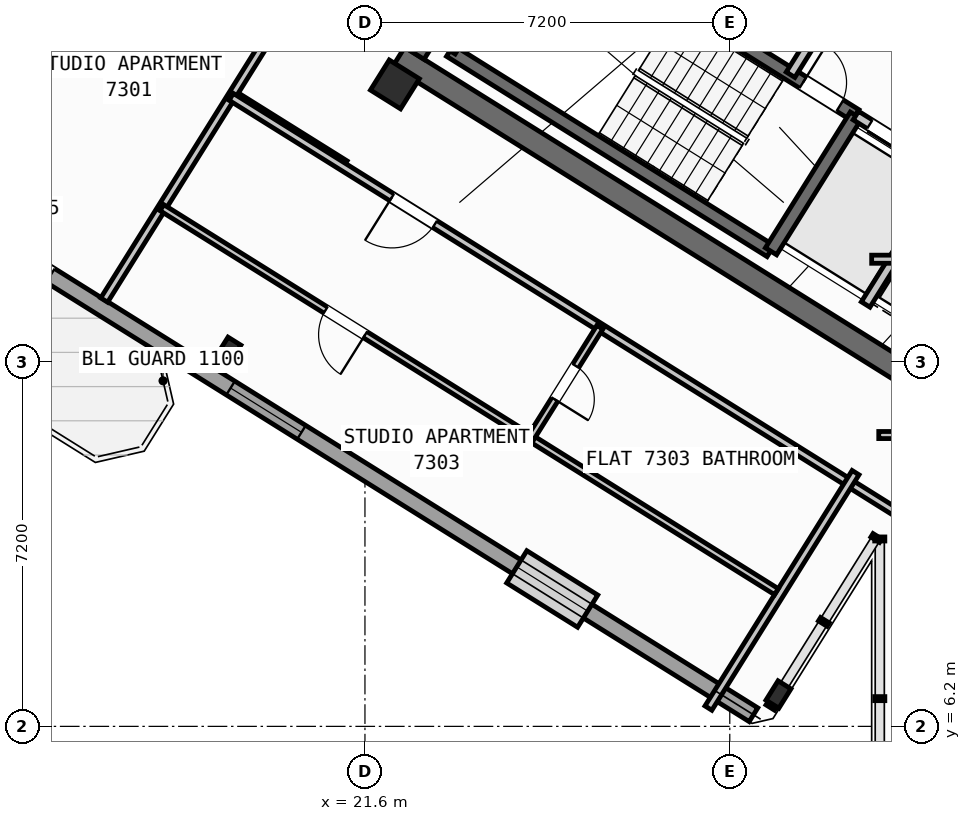
"""IFC4 building model, lengths in metres.
Left out: names, types, materials, properties, quantities, classifications, styles, units other than length and angle.
Written with IfcOpenShell. Run it as: python <this file> out.ifc"""

import sys

from ifc_helpers import new_model, si_unit, direction, frame, frame_2d, origin, origin_2d, place, context, subcontext, project, spatial, rectangle, hollow_rectangle, i_section, extrude, source, transform, mapped, element, fill, save


model = new_model("IFC4")
c1 = context("Model", 3, precision=1e-05, world=origin(), true_north=direction((0.0, 1.0)))
c2 = subcontext(c1, "Body", "Model", "MODEL_VIEW")
j1 = project(units=[si_unit("LENGTHUNIT", "METRE"), si_unit("PLANEANGLEUNIT", "RADIAN")], contexts=[c1])
p1 = place(None, origin())
s1 = spatial("IfcSite", under=j1, at=p1, CompositionType="ELEMENT")
p2 = place(p1, origin())
s2 = spatial("IfcBuilding", under=s1, at=p2, CompositionType="ELEMENT")
p3 = place(p2, frame((0.0, 0.0, 288.0)))
s3 = spatial("IfcBuildingStorey", under=s2, at=p3, CompositionType="ELEMENT", Elevation=288.0)
p4 = place(p3, frame((33.324, 12.503, 0.0), z_axis=(0.0, 0.0, 1.0), x_axis=(-0.848043529849, 0.529926571782, 0.0)))
e1 = element("IfcWall", 1, at=p4, inside=s3, PredefinedType="SHEAR", context=c2, shape_type="SweptSolid", body=[
    extrude(rectangle(XDim=13.04, YDim=0.45, at=frame_2d((6.52, 0.0))), origin(), (0.0, 0.0, 1.0), 3.35),
])
p5 = place(p3, frame((26.007, 24.976, 0.0), z_axis=(0.0, 0.0, 1.0), x_axis=(-0.529931155655, -0.848040665456, 0.0)))
e2 = element("IfcWall", 2, at=p5, inside=s3, PredefinedType="SHEAR", context=c2, shape_type="SweptSolid", body=[
    extrude(rectangle(XDim=6.475, YDim=0.45, at=frame_2d((3.238, 0.0))), origin(), (0.0, 0.0, 1.0), 3.35),
])
m1 = source(origin(), c2, "Body", "SweptSolid", [
    extrude(i_section(OverallWidth=0.3, OverallDepth=0.45, WebThickness=0.014, FlangeThickness=0.026, at=origin_2d()), origin(), (0.0, 0.0, 1.0), 3.6),
])
p6 = place(p3, frame((29.761, 6.829, 0.0), z_axis=(0.0, 0.0, 1.0), x_axis=(-0.848048096156, 0.529919264233, 0.0)))
e3 = element("IfcColumn", 3, at=p6, inside=s3, PredefinedType="COLUMN", context=c2, shape_type="MappedRepresentation", body=[
    mapped(m1, transform((0.0, 0.0, 0.0), scale=1.0)),
])
m2 = source(origin(), c2, "Body", "SweptSolid", [
    extrude(hollow_rectangle(XDim=0.7, YDim=0.7, WallThickness=0.028, at=origin_2d()), origin(), (0.0, 0.0, 1.0), 3.6),
])
p7 = place(p3, frame((22.191, 18.87, 0.0), z_axis=(0.0, 0.0, 1.0), x_axis=(-0.848048096156, 0.529919264233, 0.0)))
e4 = element("IfcColumn", 4, at=p7, inside=s3, PredefinedType="COLUMN", context=c2, shape_type="MappedRepresentation", body=[
    mapped(m2, transform((0.0, 0.0, 0.0), scale=1.0)),
])
p8 = place(p3, frame((18.906, 13.612, 0.0), z_axis=(0.0, 0.0, 1.0), x_axis=(-0.848048096156, 0.529919264233, 0.0)))
e5 = element("IfcColumn", 5, at=p8, inside=s3, PredefinedType="COLUMN", context=c2, shape_type="MappedRepresentation", body=[
    mapped(m1, transform((0.0, 0.0, 0.0), scale=1.0)),
])
p9 = place(p3, frame((29.268, 6.429, 0.0), z_axis=(0.0, 0.0, 1.0), x_axis=(-0.848048398186, 0.529918780885, 0.0)))
e6 = element("IfcWall", 6, at=p9, inside=s3, PredefinedType="STANDARD", context=c2, shape_type="SweptSolid", body=[
    extrude(rectangle(XDim=25.188, YDim=0.32, at=frame_2d((12.594, 0.0))), origin(), (0.0, 0.0, 1.0), 3.35),
])
p10 = place(p9, frame((16.362, 0.0, 0.0)))
e7 = element("IfcOpeningElement", 7, at=p10, cuts=e6, PredefinedType="OPENING", context=c2, shape_type="SweptSolid", body=[
    extrude(rectangle(XDim=1.2, YDim=2.15, at=frame_2d((0.6, 1.075))), frame((0.0, 0.17, 0.0), z_axis=(0.0, -1.0, 0.0), x_axis=(1.0, 0.0, 0.0)), (0.0, 0.0, 1.0), 0.34),
])
p11 = place(p9, frame((3.859, 0.0, 0.9)))
e8 = element("IfcOpeningElement", 8, at=p11, cuts=e6, PredefinedType="OPENING", context=c2, shape_type="SweptSolid", body=[
    extrude(rectangle(XDim=1.65, YDim=1.45, at=frame_2d((0.825, 0.725))), frame((0.0, 0.17, 0.0), z_axis=(0.0, -1.0, 0.0), x_axis=(1.0, 0.0, 0.0)), (0.0, 0.0, 1.0), 0.34),
])
p12 = place(p9, frame((10.519, 0.0, 0.9)))
e9 = element("IfcOpeningElement", 9, at=p12, cuts=e6, PredefinedType="OPENING", context=c2, shape_type="SweptSolid", body=[
    extrude(rectangle(XDim=1.65, YDim=1.45, at=frame_2d((0.825, 0.725))), frame((0.0, 0.17, 0.0), z_axis=(0.0, -1.0, 0.0), x_axis=(1.0, 0.0, 0.0)), (0.0, 0.0, 1.0), 0.34),
])
p13 = place(p9, frame((19.841, 0.0, 0.95)))
e10 = element("IfcOpeningElement", 10, at=p13, cuts=e6, PredefinedType="OPENING", context=c2, shape_type="SweptSolid", body=[
    extrude(rectangle(XDim=1.95, YDim=1.35, at=frame_2d((0.975, 0.675))), frame((0.0, 0.17, 0.0), z_axis=(0.0, -1.0, 0.0), x_axis=(1.0, 0.0, 0.0)), (0.0, 0.0, 1.0), 0.34),
])
p14 = place(p9, frame((23.478, 0.0, 1.0)))
e11 = element("IfcOpeningElement", 11, at=p14, cuts=e6, PredefinedType="OPENING", context=c2, shape_type="SweptSolid", body=[
    extrude(rectangle(XDim=0.9, YDim=1.25, at=frame_2d((0.45, 0.625))), frame((0.0, 0.17, 0.0), z_axis=(0.0, -1.0, 0.0), x_axis=(1.0, 0.0, 0.0)), (0.0, 0.0, 1.0), 0.34),
])
p15 = place(p3, frame((29.605, 15.581, 0.0), z_axis=(0.0, 0.0, 1.0), x_axis=(-0.848036911448, 0.529937163087, 0.0)))
e12 = element("IfcWall", 12, at=p15, inside=s3, PredefinedType="SHEAR", context=c2, shape_type="SweptSolid", body=[
    extrude(rectangle(XDim=7.46, YDim=0.26, at=frame_2d((3.73, 0.0))), origin(), (0.0, 0.0, 1.0), 3.35),
])
p16 = place(p3, frame((31.28, 18.261, 0.0), z_axis=(0.0, 0.0, 1.0), x_axis=(-0.848051618787, 0.529913626805, 0.0)))
e13 = element("IfcWall", 13, at=p16, inside=s3, PredefinedType="SHEAR", context=c2, shape_type="SweptSolid", body=[
    extrude(rectangle(XDim=7.46, YDim=0.26, at=frame_2d((3.73, 0.0))), origin(), (0.0, 0.0, 1.0), 3.35),
])
p17 = place(p16, frame((0.36, 0.0, 0.0)))
e14 = element("IfcOpeningElement", 14, at=p17, cuts=e13, PredefinedType="OPENING", context=c2, shape_type="SweptSolid", body=[
    extrude(rectangle(XDim=0.86, YDim=2.05, at=frame_2d((0.43, 1.025))), frame((0.0, 0.14, 0.0), z_axis=(0.0, -1.0, 0.0), x_axis=(1.0, 0.0, 0.0)), (0.0, 0.0, 1.0), 0.28),
])
p18 = place(p3, frame((31.288, 18.256, 0.0), z_axis=(0.0, 0.0, 1.0), x_axis=(-0.529943379326, -0.848033026897, 0.0)))
e15 = element("IfcWall", 15, at=p18, inside=s3, PredefinedType="SHEAR", context=c2, shape_type="SweptSolid", body=[
    extrude(rectangle(XDim=3.16, YDim=0.26, at=frame_2d((1.58, 0.0))), origin(), (0.0, 0.0, 1.0), 3.35),
])
p19 = place(p3, frame((24.945, 22.22, 0.0), z_axis=(0.0, 0.0, 1.0), x_axis=(-0.529908658664, -0.84805472316, 0.0)))
e16 = element("IfcWall", 16, at=p19, inside=s3, PredefinedType="SHEAR", context=c2, shape_type="SweptSolid", body=[
    extrude(rectangle(XDim=3.16, YDim=0.26, at=frame_2d((1.58, 0.0))), origin(), (0.0, 0.0, 1.0), 3.35),
])
p20 = place(p3, frame((34.933, 15.978, 0.0), z_axis=(0.0, 0.0, 1.0), x_axis=(-0.848055739377, 0.529907032327, 0.0)))
e17 = element("IfcWall", 17, at=p20, inside=s3, PredefinedType="STANDARD", context=c2, shape_type="SweptSolid", body=[
    extrude(rectangle(XDim=4.298, YDim=0.2, at=frame_2d((2.149, 0.0))), origin(), (0.0, 0.0, 1.0), 3.34),
])
p21 = place(p20, frame((0.448, 0.0, 0.0)))
e18 = element("IfcOpeningElement", 18, at=p21, cuts=e17, PredefinedType="OPENING", context=c2, shape_type="SweptSolid", body=[
    extrude(rectangle(XDim=1.3, YDim=2.2, at=frame_2d((0.65, 1.1))), frame((0.0, 0.11, 0.0), z_axis=(0.0, -1.0, 0.0), x_axis=(1.0, 0.0, 0.0)), (0.0, 0.0, 1.0), 0.22),
])
p22 = place(p20, frame((2.523, 0.0, 0.0)))
e19 = element("IfcOpeningElement", 19, at=p22, cuts=e17, PredefinedType="OPENING", context=c2, shape_type="SweptSolid", body=[
    extrude(rectangle(XDim=1.45, YDim=2.25, at=frame_2d((0.725, 1.125))), frame((0.0, 0.11, 0.0), z_axis=(0.0, -1.0, 0.0), x_axis=(1.0, 0.0, 0.0)), (0.0, 0.0, 1.0), 0.22),
])
p23 = place(p3, frame((36.459, 18.421, 0.0), z_axis=(0.0, 0.0, 1.0), x_axis=(-0.848059591691, 0.529900867089, 0.0)))
e20 = element("IfcWall", 20, at=p23, inside=s3, PredefinedType="STANDARD", context=c2, shape_type="SweptSolid", body=[
    extrude(rectangle(XDim=5.818, YDim=0.2, at=frame_2d((2.909, 0.0))), origin(), (0.0, 0.0, 1.0), 3.34),
])
p24 = place(p23, frame((2.598, 0.0, 0.0)))
e21 = element("IfcOpeningElement", 21, at=p24, cuts=e20, PredefinedType="OPENING", context=c2, shape_type="SweptSolid", body=[
    extrude(rectangle(XDim=1.15, YDim=2.1, at=frame_2d((0.575, 1.05))), frame((0.0, 0.11, 0.0), z_axis=(0.0, -1.0, 0.0), x_axis=(1.0, 0.0, 0.0)), (0.0, 0.0, 1.0), 0.22),
])
p25 = place(p3, frame((33.029, 17.003, 0.0), z_axis=(0.0, 0.0, 1.0), x_axis=(-0.529916267533, -0.848049968695, 0.0)))
e22 = element("IfcWall", 22, at=p25, inside=s3, PredefinedType="STANDARD", context=c2, shape_type="SweptSolid", body=[
    extrude(rectangle(XDim=2.92, YDim=0.2, at=frame_2d((1.46, 0.0))), origin(), (0.0, 0.0, 1.0), 3.34),
])
p26 = place(p3, frame((31.525, 21.504, 0.0), z_axis=(0.0, 0.0, 1.0), x_axis=(-0.529907497854, -0.848055448493, 0.0)))
e23 = element("IfcWall", 23, at=p26, inside=s3, PredefinedType="STANDARD", context=c2, shape_type="SweptSolid", body=[
    extrude(rectangle(XDim=2.88, YDim=0.2, at=frame_2d((1.44, 0.0))), origin(), (0.0, 0.0, 1.0), 3.34),
])
p27 = place(p3, frame((21.206, 17.292, 0.0), z_axis=(0.0, 0.0, 1.0), x_axis=(-0.848050851465, 0.529914854792, 0.0)))
e24 = element("IfcWall", 24, at=p27, inside=s3, PredefinedType="PARTITIONING", context=c2, shape_type="SweptSolid", body=[
    extrude(rectangle(XDim=2.61, YDim=0.16, at=frame_2d((1.305, 0.0))), origin(), (0.0, 0.0, 1.0), 3.34),
])
p28 = place(p3, frame((25.807, 29.582, 0.0), z_axis=(0.0, 0.0, 1.0), x_axis=(-0.529918119251, -0.84804881162, 0.0)))
e25 = element("IfcWall", 25, at=p28, inside=s3, PredefinedType="PARTITIONING", context=c2, shape_type="SweptSolid", body=[
    extrude(rectangle(XDim=17.65, YDim=0.16, at=frame_2d((8.825, 0.0))), origin(), (0.0, 0.0, 1.0), 3.34),
])
p29 = place(p3, frame((16.572, 21.954, 0.0), z_axis=(0.0, 0.0, 1.0), x_axis=(-0.529904903214, -0.848057069748, 0.0)))
e26 = element("IfcWall", 26, at=p29, inside=s3, PredefinedType="PARTITIONING", context=c2, shape_type="SweptSolid", body=[
    extrude(rectangle(XDim=5.601, YDim=0.16, at=frame_2d((2.801, 0.0))), origin(), (0.0, 0.0, 1.0), 2.875),
])
p30 = place(p3, frame((19.523, 33.508, 0.0), z_axis=(0.0, 0.0, 1.0), x_axis=(-0.529910765222, -0.848053406869, 0.0)))
e27 = element("IfcWall", 27, at=p30, inside=s3, PredefinedType="PARTITIONING", context=c2, shape_type="SweptSolid", body=[
    extrude(rectangle(XDim=17.92, YDim=0.11, at=frame_2d((8.96, 0.0))), origin(), (0.0, 0.0, 1.0), 3.34),
])
p31 = place(p30, frame((0.76, 0.0, 0.0)))
e28 = element("IfcOpeningElement", 28, at=p31, cuts=e27, PredefinedType="OPENING", context=c2, shape_type="SweptSolid", body=[
    extrude(rectangle(XDim=0.78, YDim=2.05, at=frame_2d((0.39, 1.025))), frame((0.0, 0.065, 0.0), z_axis=(0.0, -1.0, 0.0), x_axis=(1.0, 0.0, 0.0)), (0.0, 0.0, 1.0), 0.13),
])
p32 = place(p30, frame((6.289, 0.0, 0.0)))
e29 = element("IfcOpeningElement", 29, at=p32, cuts=e27, PredefinedType="OPENING", context=c2, shape_type="SweptSolid", body=[
    extrude(rectangle(XDim=0.92, YDim=2.08, at=frame_2d((0.46, 1.04))), frame((0.0, 0.065, 0.0), z_axis=(0.0, -1.0, 0.0), x_axis=(1.0, 0.0, 0.0)), (0.0, 0.0, 1.0), 0.13),
])
p33 = place(p3, frame((32.164, 10.374, 0.0), z_axis=(0.0, 0.0, 1.0), x_axis=(-0.848044107957, 0.529925646633, 0.0)))
e30 = element("IfcWall", 30, at=p33, inside=s3, PredefinedType="PARTITIONING", context=c2, shape_type="SweptSolid", body=[
    extrude(rectangle(XDim=15.57, YDim=0.16, at=frame_2d((7.785, 0.0))), origin(), (0.0, 0.0, 1.0), 3.34),
])
p34 = place(p33, frame((10.83, 0.0, 0.0)))
e31 = element("IfcOpeningElement", 31, at=p34, cuts=e30, PredefinedType="OPENING", context=c2, shape_type="SweptSolid", body=[
    extrude(rectangle(XDim=1.0, YDim=2.1, at=frame_2d((0.5, 1.05))), frame((0.0, 0.09, 0.0), z_axis=(0.0, -1.0, 0.0), x_axis=(1.0, 0.0, 0.0)), (0.0, 0.0, 1.0), 0.18),
])
p35 = place(p3, frame((31.282, 11.208, 0.0), z_axis=(0.0, 0.0, 1.0), x_axis=(-0.529938869374, -0.84803584519, 0.0)))
e32 = element("IfcWall", 32, at=p35, inside=s3, PredefinedType="PARTITIONING", context=c2, shape_type="SweptSolid", body=[
    extrude(rectangle(XDim=5.48, YDim=0.16, at=frame_2d((2.74, 0.0))), origin(), (0.0, 0.0, 1.0), 3.34),
])
p36 = place(p3, frame((29.72, 8.859, 0.0), z_axis=(0.0, 0.0, 1.0), x_axis=(-0.848049134363, 0.529917602752, 0.0)))
e33 = element("IfcWall", 33, at=p36, inside=s3, PredefinedType="PLUMBINGWALL", context=c2, shape_type="SweptSolid", body=[
    extrude(rectangle(XDim=14.3, YDim=0.14, at=frame_2d((7.15, 0.0))), origin(), (0.0, 0.0, 1.0), 3.34),
])
p37 = place(p36, frame((9.57, 0.0, 0.0)))
e34 = element("IfcOpeningElement", 34, at=p37, cuts=e33, PredefinedType="OPENING", context=c2, shape_type="SweptSolid", body=[
    extrude(rectangle(XDim=0.92, YDim=2.08, at=frame_2d((0.46, 1.04))), frame((0.0, 0.08, 0.0), z_axis=(0.0, -1.0, 0.0), x_axis=(1.0, 0.0, 0.0)), (0.0, 0.0, 1.0), 0.16),
])
p38 = place(p3, frame((26.237, 14.078, 0.0), z_axis=(0.0, 0.0, 1.0), x_axis=(-0.52995640672, -0.848024885824, 0.0)))
e35 = element("IfcWall", 35, at=p38, inside=s3, PredefinedType="PLUMBINGWALL", context=c2, shape_type="SweptSolid", body=[
    extrude(rectangle(XDim=2.58, YDim=0.14, at=frame_2d((1.29, 0.0))), origin(), (0.0, 0.0, 1.0), 3.34),
])
p39 = place(p38, frame((0.9, 0.0, 0.0)))
e36 = element("IfcOpeningElement", 36, at=p39, cuts=e35, PredefinedType="OPENING", context=c2, shape_type="SweptSolid", body=[
    extrude(rectangle(XDim=0.78, YDim=2.05, at=frame_2d((0.39, 1.025))), frame((0.0, 0.08, 0.0), z_axis=(0.0, -1.0, 0.0), x_axis=(1.0, 0.0, 0.0)), (0.0, 0.0, 1.0), 0.16),
])
p40 = place(p3, frame((31.6, 15.42, 0.0), z_axis=(0.0, 0.0, 1.0), x_axis=(1.0, 0.0, 0.0)))
e37 = element("IfcWall", 37, at=p40, inside=s3, PredefinedType="PARTITIONING", context=c2, shape_type="SweptSolid", body=[
    extrude(rectangle(XDim=2.984, YDim=0.16, at=frame_2d((1.492, 0.0))), origin(), (0.0, 0.0, 1.0), 3.34),
])
p41 = place(p3, frame((31.74, 11.95, 0.0), z_axis=(0.0, 0.0, 1.0), x_axis=(1.0, 0.0, 0.0)))
e38 = element("IfcWall", 38, at=p41, inside=s3, PredefinedType="PLUMBINGWALL", context=c2, shape_type="SweptSolid", body=[
    extrude(rectangle(XDim=0.842, YDim=0.14, at=frame_2d((0.421, 0.0))), origin(), (0.0, 0.0, 1.0), 3.34),
])
m3 = source(origin(), c2, "Body", "SweptSolid", [
    extrude(rectangle(XDim=1.65, YDim=1.45, at=frame_2d((0.825, 0.725))), frame((0.0, 0.03, 0.0), z_axis=(0.0, -1.0, 0.0), x_axis=(1.0, 0.0, 0.0)), (0.0, 0.0, 1.0), 0.06),
])
p42 = place(p11, origin())
e39 = element("IfcWindow", 39, at=p42, inside=s3, PartitioningType="SINGLE_PANEL", PredefinedType="WINDOW", context=c2, shape_type="MappedRepresentation", body=[
    mapped(m3, transform((0.0, 0.0, 0.0), scale=1.0)),
])
fill(e8, e39)
p43 = place(p12, origin())
e40 = element("IfcWindow", 40, at=p43, inside=s3, PartitioningType="SINGLE_PANEL", PredefinedType="WINDOW", context=c2, shape_type="MappedRepresentation", body=[
    mapped(m3, transform((0.0, 0.0, 0.0), scale=1.0)),
])
fill(e9, e40)
m4 = source(origin(), c2, "Body", "SweptSolid", [
    extrude(rectangle(XDim=0.86, YDim=2.05, at=frame_2d((0.43, 1.025))), frame((0.0, 0.025, 0.0), z_axis=(0.0, -1.0, 0.0), x_axis=(1.0, 0.0, 0.0)), (0.0, 0.0, 1.0), 0.05),
])
p44 = place(p17, frame((0.86, 0.0, 0.0), z_axis=(0.0, 0.0, 1.0), x_axis=(-1.0, 0.0, 0.0)))
e41 = element("IfcDoor", 41, at=p44, inside=s3, OperationType="SINGLE_SWING_LEFT", PredefinedType="DOOR", context=c2, shape_type="MappedRepresentation", body=[
    mapped(m4, transform((0.0, 0.0, 0.0), scale=1.0)),
])
fill(e14, e41)
m5 = source(origin(), c2, "Body", "SweptSolid", [
    extrude(rectangle(XDim=1.45, YDim=2.25, at=frame_2d((0.725, 1.125))), frame((0.0, 0.025, 0.0), z_axis=(0.0, -1.0, 0.0), x_axis=(1.0, 0.0, 0.0)), (0.0, 0.0, 1.0), 0.05),
])
p45 = place(p22, origin())
e42 = element("IfcDoor", 42, at=p45, inside=s3, OperationType="DOUBLE_DOOR_SLIDING", PredefinedType="DOOR", context=c2, shape_type="MappedRepresentation", body=[
    mapped(m5, transform((0.0, 0.0, 0.0), scale=1.0)),
])
fill(e19, e42)
m6 = source(origin(), c2, "Body", "SweptSolid", [
    extrude(rectangle(XDim=1.0, YDim=2.1, at=frame_2d((0.5, 1.05))), frame((0.0, 0.025, 0.0), z_axis=(0.0, -1.0, 0.0), x_axis=(1.0, 0.0, 0.0)), (0.0, 0.0, 1.0), 0.05),
])
p46 = place(p34, origin())
e43 = element("IfcDoor", 43, at=p46, inside=s3, OperationType="SINGLE_SWING_RIGHT", PredefinedType="DOOR", context=c2, shape_type="MappedRepresentation", body=[
    mapped(m6, transform((0.0, 0.0, 0.0), scale=1.0)),
])
fill(e31, e43)
m7 = source(origin(), c2, "Body", "SweptSolid", [
    extrude(rectangle(XDim=0.92, YDim=2.08, at=frame_2d((0.46, 1.04))), frame((0.0, 0.025, 0.0), z_axis=(0.0, -1.0, 0.0), x_axis=(1.0, 0.0, 0.0)), (0.0, 0.0, 1.0), 0.05),
])
p47 = place(p37, origin())
e44 = element("IfcDoor", 44, at=p47, inside=s3, OperationType="SINGLE_SWING_LEFT", PredefinedType="DOOR", context=c2, shape_type="MappedRepresentation", body=[
    mapped(m7, transform((0.0, 0.0, 0.0), scale=1.0)),
])
fill(e34, e44)
m8 = source(origin(), c2, "Body", "SweptSolid", [
    extrude(rectangle(XDim=0.78, YDim=2.05, at=frame_2d((0.39, 1.025))), frame((0.0, 0.025, 0.0), z_axis=(0.0, -1.0, 0.0), x_axis=(1.0, 0.0, 0.0)), (0.0, 0.0, 1.0), 0.05),
])
p48 = place(p39, origin())
e45 = element("IfcDoor", 45, at=p48, inside=s3, OperationType="SINGLE_SWING_RIGHT", PredefinedType="DOOR", context=c2, shape_type="MappedRepresentation", body=[
    mapped(m8, transform((0.0, 0.0, 0.0), scale=1.0)),
])
fill(e36, e45)
save(model, sys.argv[1])
